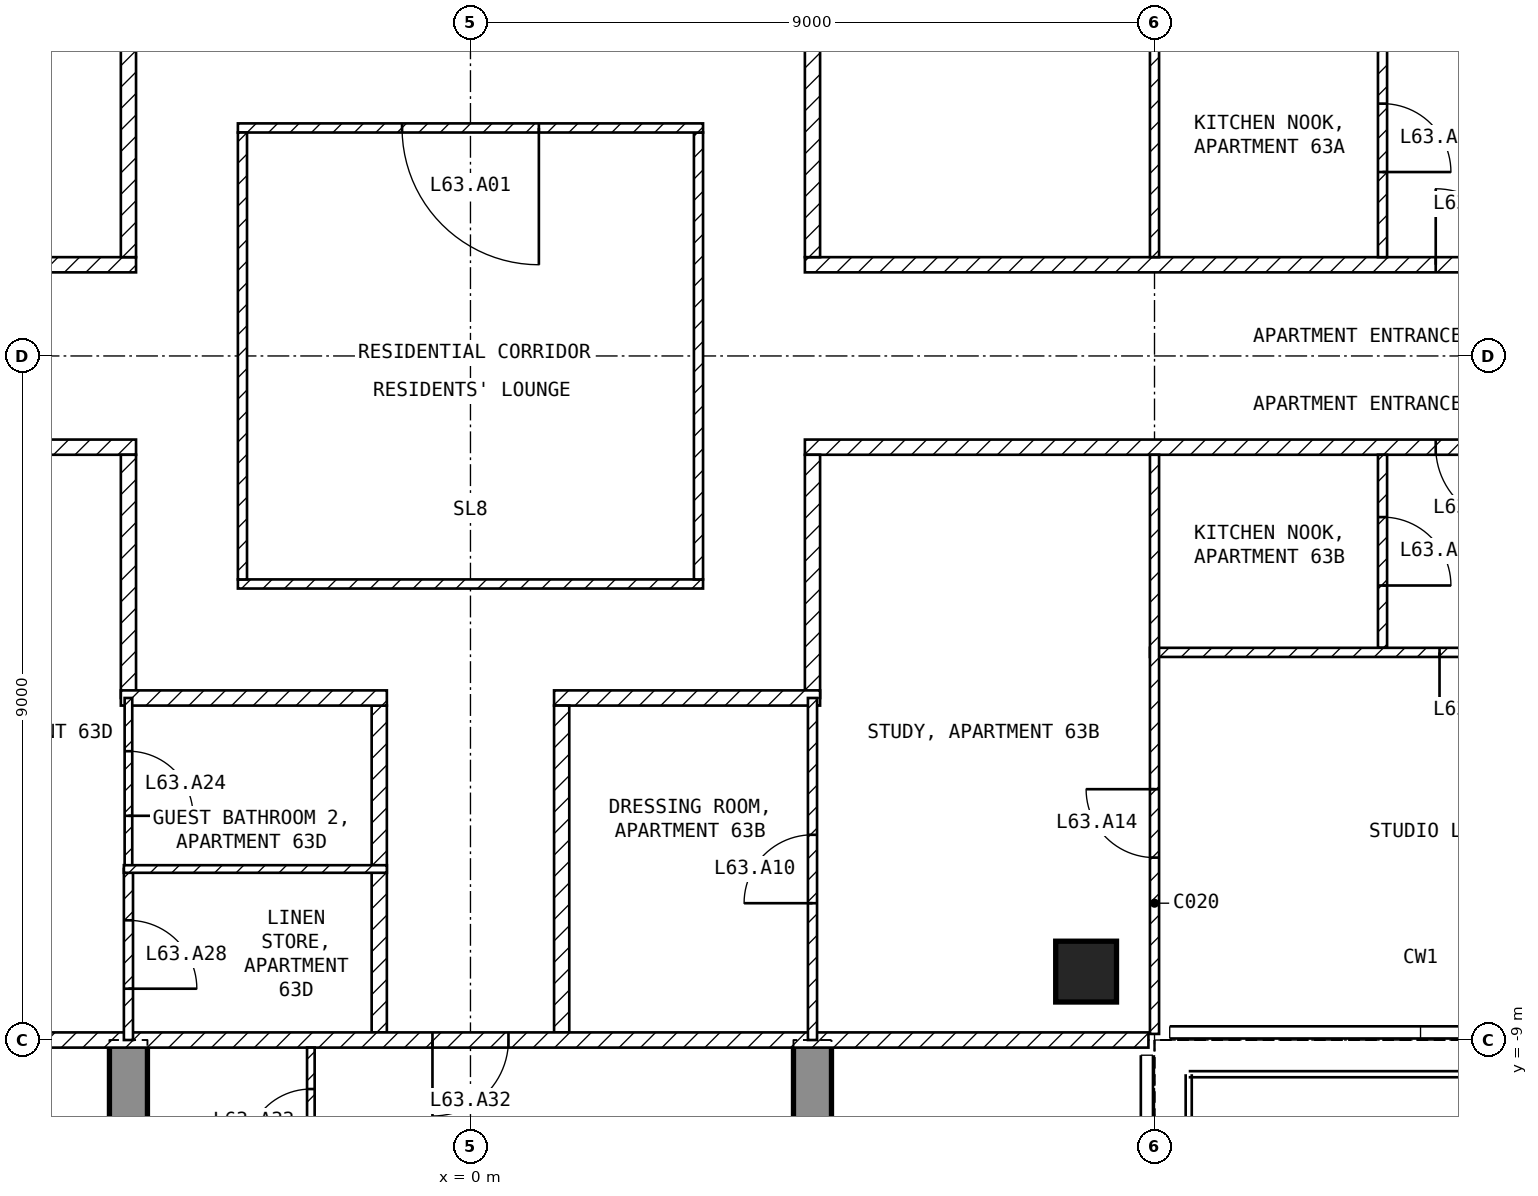
"""IFC4 building model, lengths in metres.
Left out: names, types, materials, properties, quantities, classifications, styles, units other than length and angle.
Written with IfcOpenShell. Run it as: python <this file> out.ifc"""

import sys

from ifc_helpers import new_model, si_unit, direction, frame, frame_2d, origin, origin_2d, place, context, subcontext, project, spatial, polyline, rectangle, outline, extrude, element, fill, save


model = new_model("IFC4")
c1 = context("Model", 3, precision=1e-05, world=origin(), true_north=direction((0.0, 1.0)))
c2 = subcontext(c1, "Body", "Model", "MODEL_VIEW")
j1 = project(units=[si_unit("LENGTHUNIT", "METRE"), si_unit("PLANEANGLEUNIT", "RADIAN")], contexts=[c1])
p1 = place(None, origin())
s1 = spatial("IfcSite", under=j1, at=p1, CompositionType="ELEMENT")
p2 = place(p1, origin())
s2 = spatial("IfcBuilding", under=s1, at=p2, CompositionType="ELEMENT")
p3 = place(p2, frame((0.0, 0.0, 250.0)))
s3 = spatial("IfcBuildingStorey", under=s2, at=p3, CompositionType="ELEMENT", Elevation=250.0)
p4 = place(p3, frame((8.1, -8.1, -0.25), z_axis=(0.0, 0.0, 1.0), x_axis=(1.0, 0.0, 0.0)))
e1 = element("IfcColumn", 1, at=p4, inside=s3, PredefinedType="COLUMN", context=c2, shape_type="SweptSolid", body=[
    extrude(rectangle(XDim=0.8, YDim=0.8, at=origin_2d()), origin(), (0.0, 0.0, 1.0), 3.5),
])
for number, where, z_axis, x_axis in (
    (2, (-4.75, -16.7, -0.25), (1.0, 0.0, 0.0), (0.0, 1.0, 0.0)),
    (3, (4.25, -16.7, -0.25), (1.0, 0.0, 0.0), (0.0, 1.0, 0.0)),
):
    element("IfcWall", number, at=place(p3, frame(where, z_axis=z_axis, x_axis=x_axis)), inside=s3, PredefinedType="SHEAR", context=c2, shape_type="SweptSolid", body=[
        extrude(outline(polyline([(0.0, 0.0), (3.2, 0.0), (3.2, 2.65), (5.6, 2.65), (5.6, 0.0), (7.7, 0.0), (7.7, 3.5), (0.0, 3.5), (0.0, 0.0)])), origin(), (0.0, 0.0, 1.0), 0.5),
    ])
p5 = place(p3, frame((-3.06, -3.0, 0.0), z_axis=(0.0, 0.0, 1.0), x_axis=(1.0, 0.0, 0.0)))
e4 = element("IfcWall", 4, at=p5, inside=s3, PredefinedType="PARTITIONING", context=c2, shape_type="SweptSolid", body=[
    extrude(rectangle(XDim=6.12, YDim=0.12, at=frame_2d((3.06, 0.0))), origin(), (0.0, 0.0, 1.0), 3.25),
])
p6 = place(p3, frame((3.0, -2.94, 0.0), z_axis=(0.0, 0.0, 1.0), x_axis=(0.0, 1.0, 0.0)))
e5 = element("IfcWall", 5, at=p6, inside=s3, PredefinedType="PARTITIONING", context=c2, shape_type="SweptSolid", body=[
    extrude(rectangle(XDim=5.88, YDim=0.12, at=frame_2d((2.94, 0.0))), origin(), (0.0, 0.0, 1.0), 3.25),
])
p7 = place(p3, frame((3.06, 3.0, 0.0), z_axis=(0.0, 0.0, 1.0), x_axis=(-1.0, 0.0, 0.0)))
e6 = element("IfcWall", 6, at=p7, inside=s3, PredefinedType="PARTITIONING", context=c2, shape_type="SweptSolid", body=[
    extrude(rectangle(XDim=6.12, YDim=0.12, at=frame_2d((3.06, 0.0))), origin(), (0.0, 0.0, 1.0), 3.25),
])
p8 = place(p7, frame((2.16, 0.0, 0.0)))
e7 = element("IfcOpeningElement", 7, at=p8, cuts=e6, PredefinedType="OPENING", context=c2, shape_type="SweptSolid", body=[
    extrude(rectangle(XDim=1.8, YDim=2.1, at=frame_2d((0.9, 1.05))), frame((0.0, 0.07, 0.0), z_axis=(0.0, -1.0, 0.0), x_axis=(1.0, 0.0, 0.0)), (0.0, 0.0, 1.0), 0.14),
])
p9 = place(p3, frame((-3.0, 2.94, 0.0), z_axis=(0.0, 0.0, 1.0), x_axis=(0.0, -1.0, 0.0)))
e8 = element("IfcWall", 8, at=p9, inside=s3, PredefinedType="PARTITIONING", context=c2, shape_type="SweptSolid", body=[
    extrude(rectangle(XDim=5.88, YDim=0.12, at=frame_2d((2.94, 0.0))), origin(), (0.0, 0.0, 1.0), 3.25),
])
p10 = place(p3, frame((4.4, 1.2, 0.0), z_axis=(0.0, 0.0, 1.0), x_axis=(1.0, 0.0, 0.0)))
e9 = element("IfcWall", 9, at=p10, inside=s3, PredefinedType="PARTITIONING", context=c2, shape_type="SweptSolid", body=[
    extrude(rectangle(XDim=17.2, YDim=0.2, at=frame_2d((8.6, 0.0))), origin(), (0.0, 0.0, 1.0), 3.25),
])
p11 = place(p10, frame((8.3, 0.0, 0.0)))
e10 = element("IfcOpeningElement", 10, at=p11, cuts=e9, PredefinedType="OPENING", context=c2, shape_type="SweptSolid", body=[
    extrude(rectangle(XDim=1.0, YDim=2.1, at=frame_2d((0.5, 1.05))), frame((0.0, 0.11, 0.0), z_axis=(0.0, -1.0, 0.0), x_axis=(1.0, 0.0, 0.0)), (0.0, 0.0, 1.0), 0.22),
])
p12 = place(p3, frame((4.5, 4.5, 0.0), z_axis=(0.0, 0.0, 1.0), x_axis=(0.0, -1.0, 0.0)))
e11 = element("IfcWall", 11, at=p12, inside=s3, PredefinedType="PARTITIONING", context=c2, shape_type="SweptSolid", body=[
    extrude(rectangle(XDim=3.2, YDim=0.2, at=frame_2d((1.6, 0.0))), origin(), (0.0, 0.0, 1.0), 3.25),
])
p13 = place(p3, frame((21.6, -1.2, 0.0), z_axis=(0.0, 0.0, 1.0), x_axis=(-1.0, 0.0, 0.0)))
e12 = element("IfcWall", 12, at=p13, inside=s3, PredefinedType="PARTITIONING", context=c2, shape_type="SweptSolid", body=[
    extrude(rectangle(XDim=17.2, YDim=0.2, at=frame_2d((8.6, 0.0))), origin(), (0.0, 0.0, 1.0), 3.25),
])
p14 = place(p13, frame((7.9, 0.0, 0.0)))
e13 = element("IfcOpeningElement", 13, at=p14, cuts=e12, PredefinedType="OPENING", context=c2, shape_type="SweptSolid", body=[
    extrude(rectangle(XDim=1.0, YDim=2.1, at=frame_2d((0.5, 1.05))), frame((0.0, 0.11, 0.0), z_axis=(0.0, -1.0, 0.0), x_axis=(1.0, 0.0, 0.0)), (0.0, 0.0, 1.0), 0.22),
])
p15 = place(p3, frame((4.5, -1.3, 0.0), z_axis=(0.0, 0.0, 1.0), x_axis=(0.0, -1.0, 0.0)))
e14 = element("IfcWall", 14, at=p15, inside=s3, PredefinedType="PARTITIONING", context=c2, shape_type="SweptSolid", body=[
    extrude(rectangle(XDim=3.2, YDim=0.2, at=frame_2d((1.6, 0.0))), origin(), (0.0, 0.0, 1.0), 3.25),
])
p16 = place(p3, frame((4.6, -4.5, 0.0), z_axis=(0.0, 0.0, 1.0), x_axis=(-1.0, 0.0, 0.0)))
e15 = element("IfcWall", 15, at=p16, inside=s3, PredefinedType="PARTITIONING", context=c2, shape_type="SweptSolid", body=[
    extrude(rectangle(XDim=3.5, YDim=0.2, at=frame_2d((1.75, 0.0))), origin(), (0.0, 0.0, 1.0), 3.25),
])
p17 = place(p3, frame((1.2, -4.6, 0.0), z_axis=(0.0, 0.0, 1.0), x_axis=(0.0, -1.0, 0.0)))
e16 = element("IfcWall", 16, at=p17, inside=s3, PredefinedType="PARTITIONING", context=c2, shape_type="SweptSolid", body=[
    extrude(rectangle(XDim=4.3, YDim=0.2, at=frame_2d((2.15, 0.0))), origin(), (0.0, 0.0, 1.0), 3.25),
])
p18 = place(p3, frame((-21.6, 1.2, 0.0), z_axis=(0.0, 0.0, 1.0), x_axis=(1.0, 0.0, 0.0)))
e17 = element("IfcWall", 17, at=p18, inside=s3, PredefinedType="PARTITIONING", context=c2, shape_type="SweptSolid", body=[
    extrude(rectangle(XDim=17.2, YDim=0.2, at=frame_2d((8.6, 0.0))), origin(), (0.0, 0.0, 1.0), 3.25),
])
p19 = place(p18, frame((10.3, 0.0, 0.0)))
e18 = element("IfcOpeningElement", 18, at=p19, cuts=e17, PredefinedType="OPENING", context=c2, shape_type="SweptSolid", body=[
    extrude(rectangle(XDim=1.0, YDim=2.1, at=frame_2d((0.5, 1.05))), frame((0.0, 0.11, 0.0), z_axis=(0.0, -1.0, 0.0), x_axis=(1.0, 0.0, 0.0)), (0.0, 0.0, 1.0), 0.22),
])
p20 = place(p3, frame((-4.5, 1.3, 0.0), z_axis=(0.0, 0.0, 1.0), x_axis=(0.0, 1.0, 0.0)))
e19 = element("IfcWall", 19, at=p20, inside=s3, PredefinedType="PARTITIONING", context=c2, shape_type="SweptSolid", body=[
    extrude(rectangle(XDim=3.2, YDim=0.2, at=frame_2d((1.6, 0.0))), origin(), (0.0, 0.0, 1.0), 3.25),
])
p21 = place(p3, frame((-4.4, -1.2, 0.0), z_axis=(0.0, 0.0, 1.0), x_axis=(-1.0, 0.0, 0.0)))
e20 = element("IfcWall", 20, at=p21, inside=s3, PredefinedType="PARTITIONING", context=c2, shape_type="SweptSolid", body=[
    extrude(rectangle(XDim=17.2, YDim=0.2, at=frame_2d((8.6, 0.0))), origin(), (0.0, 0.0, 1.0), 3.25),
])
p22 = place(p21, frame((5.375, 0.0, 0.0)))
e21 = element("IfcOpeningElement", 21, at=p22, cuts=e20, PredefinedType="OPENING", context=c2, shape_type="SweptSolid", body=[
    extrude(rectangle(XDim=1.0, YDim=2.1, at=frame_2d((0.5, 1.05))), frame((0.0, 0.11, 0.0), z_axis=(0.0, -1.0, 0.0), x_axis=(1.0, 0.0, 0.0)), (0.0, 0.0, 1.0), 0.22),
])
p23 = place(p3, frame((-4.5, -4.5, 0.0), z_axis=(0.0, 0.0, 1.0), x_axis=(0.0, 1.0, 0.0)))
e22 = element("IfcWall", 22, at=p23, inside=s3, PredefinedType="PARTITIONING", context=c2, shape_type="SweptSolid", body=[
    extrude(rectangle(XDim=3.2, YDim=0.2, at=frame_2d((1.6, 0.0))), origin(), (0.0, 0.0, 1.0), 3.25),
])
p24 = place(p3, frame((-1.2, -8.9, 0.0), z_axis=(0.0, 0.0, 1.0), x_axis=(0.0, 1.0, 0.0)))
e23 = element("IfcWall", 23, at=p24, inside=s3, PredefinedType="PARTITIONING", context=c2, shape_type="SweptSolid", body=[
    extrude(rectangle(XDim=4.3, YDim=0.2, at=frame_2d((2.15, 0.0))), origin(), (0.0, 0.0, 1.0), 3.25),
])
p25 = place(p3, frame((-1.1, -4.5, 0.0), z_axis=(0.0, 0.0, 1.0), x_axis=(-1.0, 0.0, 0.0)))
e24 = element("IfcWall", 24, at=p25, inside=s3, PredefinedType="PARTITIONING", context=c2, shape_type="SweptSolid", body=[
    extrude(rectangle(XDim=3.5, YDim=0.2, at=frame_2d((1.75, 0.0))), origin(), (0.0, 0.0, 1.0), 3.25),
])
p26 = place(p3, frame((8.92, -9.0, 0.0), z_axis=(0.0, 0.0, 1.0), x_axis=(-1.0, 0.0, 0.0)))
e25 = element("IfcWall", 25, at=p26, inside=s3, PredefinedType="PARTITIONING", context=c2, shape_type="SweptSolid", body=[
    extrude(rectangle(XDim=17.84, YDim=0.2, at=frame_2d((8.92, 0.0))), origin(), (0.0, 0.0, 1.0), 3.25),
])
p27 = place(p26, frame((8.42, 0.0, 0.0)))
e26 = element("IfcOpeningElement", 26, at=p27, cuts=e25, PredefinedType="OPENING", context=c2, shape_type="SweptSolid", body=[
    extrude(rectangle(XDim=1.0, YDim=2.1, at=frame_2d((0.5, 1.05))), frame((0.0, 0.11, 0.0), z_axis=(0.0, -1.0, 0.0), x_axis=(1.0, 0.0, 0.0)), (0.0, 0.0, 1.0), 0.22),
])
p28 = place(p3, frame((12.0, 4.44, 0.0), z_axis=(0.0, 0.0, 1.0), x_axis=(0.0, -1.0, 0.0)))
e27 = element("IfcWall", 27, at=p28, inside=s3, PredefinedType="PARTITIONING", context=c2, shape_type="SweptSolid", body=[
    extrude(rectangle(XDim=3.14, YDim=0.12, at=frame_2d((1.57, 0.0))), origin(), (0.0, 0.0, 1.0), 3.25),
])
p29 = place(p28, frame((1.12, 0.0, 0.0)))
e28 = element("IfcOpeningElement", 28, at=p29, cuts=e27, PredefinedType="OPENING", context=c2, shape_type="SweptSolid", body=[
    extrude(rectangle(XDim=0.9, YDim=2.1, at=frame_2d((0.45, 1.05))), frame((0.0, 0.07, 0.0), z_axis=(0.0, -1.0, 0.0), x_axis=(1.0, 0.0, 0.0)), (0.0, 0.0, 1.0), 0.14),
])
p30 = place(p3, frame((9.0, 1.3, 0.0), z_axis=(0.0, 0.0, 1.0), x_axis=(0.0, 1.0, 0.0)))
e29 = element("IfcWall", 29, at=p30, inside=s3, PredefinedType="PARTITIONING", context=c2, shape_type="SweptSolid", body=[
    extrude(rectangle(XDim=7.62, YDim=0.12, at=frame_2d((3.81, 0.0))), origin(), (0.0, 0.0, 1.0), 3.25),
])
p31 = place(p30, frame((4.25, 0.0, 0.0)))
e30 = element("IfcOpeningElement", 30, at=p31, cuts=e29, PredefinedType="OPENING", context=c2, shape_type="SweptSolid", body=[
    extrude(rectangle(XDim=0.9, YDim=2.1, at=frame_2d((0.45, 1.05))), frame((0.0, 0.07, 0.0), z_axis=(0.0, -1.0, 0.0), x_axis=(1.0, 0.0, 0.0)), (0.0, 0.0, 1.0), 0.14),
])
p32 = place(p3, frame((12.0, -1.3, 0.0), z_axis=(0.0, 0.0, 1.0), x_axis=(0.0, -1.0, 0.0)))
e31 = element("IfcWall", 31, at=p32, inside=s3, PredefinedType="PARTITIONING", context=c2, shape_type="SweptSolid", body=[
    extrude(rectangle(XDim=2.54, YDim=0.12, at=frame_2d((1.27, 0.0))), origin(), (0.0, 0.0, 1.0), 3.25),
])
p33 = place(p32, frame((0.82, 0.0, 0.0)))
e32 = element("IfcOpeningElement", 32, at=p33, cuts=e31, PredefinedType="OPENING", context=c2, shape_type="SweptSolid", body=[
    extrude(rectangle(XDim=0.9, YDim=2.1, at=frame_2d((0.45, 1.05))), frame((0.0, 0.07, 0.0), z_axis=(0.0, -1.0, 0.0), x_axis=(1.0, 0.0, 0.0)), (0.0, 0.0, 1.0), 0.14),
])
p34 = place(p3, frame((16.8, -3.9, 0.0), z_axis=(0.0, 0.0, 1.0), x_axis=(-1.0, 0.0, 0.0)))
e33 = element("IfcWall", 33, at=p34, inside=s3, PredefinedType="PARTITIONING", context=c2, shape_type="SweptSolid", body=[
    extrude(rectangle(XDim=7.86, YDim=0.12, at=frame_2d((3.93, 0.0))), origin(), (0.0, 0.0, 1.0), 3.25),
])
p35 = place(p34, frame((3.15, 0.0, 0.0)))
e34 = element("IfcOpeningElement", 34, at=p35, cuts=e33, PredefinedType="OPENING", context=c2, shape_type="SweptSolid", body=[
    extrude(rectangle(XDim=0.9, YDim=2.1, at=frame_2d((0.45, 1.05))), frame((0.0, 0.07, 0.0), z_axis=(0.0, -1.0, 0.0), x_axis=(1.0, 0.0, 0.0)), (0.0, 0.0, 1.0), 0.14),
])
p36 = place(p3, frame((9.0, -8.92, 0.0), z_axis=(0.0, 0.0, 1.0), x_axis=(0.0, 1.0, 0.0)))
e35 = element("IfcWall", 35, at=p36, inside=s3, PredefinedType="PARTITIONING", context=c2, shape_type="SweptSolid", body=[
    extrude(rectangle(XDim=7.62, YDim=0.12, at=frame_2d((3.81, 0.0))), origin(), (0.0, 0.0, 1.0), 3.25),
])
p37 = place(p36, frame((2.32, 0.0, 0.0)))
e36 = element("IfcOpeningElement", 36, at=p37, cuts=e35, PredefinedType="OPENING", context=c2, shape_type="SweptSolid", body=[
    extrude(rectangle(XDim=0.9, YDim=2.1, at=frame_2d((0.45, 1.05))), frame((0.0, 0.07, 0.0), z_axis=(0.0, -1.0, 0.0), x_axis=(1.0, 0.0, 0.0)), (0.0, 0.0, 1.0), 0.14),
])
p38 = place(p3, frame((4.5, -9.0, 0.0), z_axis=(0.0, 0.0, 1.0), x_axis=(0.0, 1.0, 0.0)))
e37 = element("IfcWall", 37, at=p38, inside=s3, PredefinedType="PARTITIONING", context=c2, shape_type="SweptSolid", body=[
    extrude(rectangle(XDim=4.5, YDim=0.12, at=frame_2d((2.25, 0.0))), origin(), (0.0, 0.0, 1.0), 3.25),
])
p39 = place(p38, frame((1.8, 0.0, 0.0)))
e38 = element("IfcOpeningElement", 38, at=p39, cuts=e37, PredefinedType="OPENING", context=c2, shape_type="SweptSolid", body=[
    extrude(rectangle(XDim=0.9, YDim=2.1, at=frame_2d((0.45, 1.05))), frame((0.0, 0.07, 0.0), z_axis=(0.0, -1.0, 0.0), x_axis=(1.0, 0.0, 0.0)), (0.0, 0.0, 1.0), 0.14),
])
p40 = place(p3, frame((-4.5, -4.5, 0.0), z_axis=(0.0, 0.0, 1.0), x_axis=(0.0, -1.0, 0.0)))
e39 = element("IfcWall", 39, at=p40, inside=s3, PredefinedType="PARTITIONING", context=c2, shape_type="SweptSolid", body=[
    extrude(rectangle(XDim=2.25, YDim=0.1, at=frame_2d((1.125, 0.0))), origin(), (0.0, 0.0, 1.0), 3.25),
])
p41 = place(p40, frame((0.7, 0.0, 0.0)))
e40 = element("IfcOpeningElement", 40, at=p41, cuts=e39, PredefinedType="OPENING", context=c2, shape_type="SweptSolid", body=[
    extrude(rectangle(XDim=0.85, YDim=2.1, at=frame_2d((0.425, 1.05))), frame((0.0, 0.06, 0.0), z_axis=(0.0, -1.0, 0.0), x_axis=(1.0, 0.0, 0.0)), (0.0, 0.0, 1.0), 0.12),
])
p42 = place(p3, frame((-4.5, -6.75, 0.0), z_axis=(0.0, 0.0, 1.0), x_axis=(0.0, -1.0, 0.0)))
e41 = element("IfcWall", 41, at=p42, inside=s3, PredefinedType="PARTITIONING", context=c2, shape_type="SweptSolid", body=[
    extrude(rectangle(XDim=2.25, YDim=0.12, at=frame_2d((1.125, 0.0))), origin(), (0.0, 0.0, 1.0), 3.25),
])
p43 = place(p42, frame((0.675, 0.0, 0.0)))
e42 = element("IfcOpeningElement", 42, at=p43, cuts=e41, PredefinedType="OPENING", context=c2, shape_type="SweptSolid", body=[
    extrude(rectangle(XDim=0.9, YDim=2.1, at=frame_2d((0.45, 1.05))), frame((0.0, 0.07, 0.0), z_axis=(0.0, -1.0, 0.0), x_axis=(1.0, 0.0, 0.0)), (0.0, 0.0, 1.0), 0.14),
])
p44 = place(p3, frame((-1.1, -6.75, 0.0), z_axis=(0.0, 0.0, 1.0), x_axis=(-1.0, 0.0, 0.0)))
e43 = element("IfcWall", 43, at=p44, inside=s3, PredefinedType="PARTITIONING", context=c2, shape_type="SweptSolid", body=[
    extrude(rectangle(XDim=3.46, YDim=0.1, at=frame_2d((1.73, 0.0))), origin(), (0.0, 0.0, 1.0), 3.25),
])
p45 = place(p3, frame((-2.1, -11.04, 0.0), z_axis=(0.0, 0.0, 1.0), x_axis=(0.0, 1.0, 0.0)))
e44 = element("IfcWall", 44, at=p45, inside=s3, PredefinedType="PARTITIONING", context=c2, shape_type="SweptSolid", body=[
    extrude(rectangle(XDim=1.94, YDim=0.1, at=frame_2d((0.97, 0.0))), origin(), (0.0, 0.0, 1.0), 3.25),
])
p46 = place(p45, frame((0.545, 0.0, 0.0)))
e45 = element("IfcOpeningElement", 45, at=p46, cuts=e44, PredefinedType="OPENING", context=c2, shape_type="SweptSolid", body=[
    extrude(rectangle(XDim=0.85, YDim=2.1, at=frame_2d((0.425, 1.05))), frame((0.0, 0.06, 0.0), z_axis=(0.0, -1.0, 0.0), x_axis=(1.0, 0.0, 0.0)), (0.0, 0.0, 1.0), 0.12),
])
p47 = place(p8, origin())
e46 = element("IfcDoor", 46, at=p47, inside=s3, OperationType="SINGLE_SWING_LEFT", PredefinedType="DOOR", context=c2, shape_type="SweptSolid", body=[
    extrude(rectangle(XDim=1.8, YDim=2.1, at=frame_2d((0.9, 1.05))), frame((0.0, 0.025, 0.0), z_axis=(0.0, -1.0, 0.0), x_axis=(1.0, 0.0, 0.0)), (0.0, 0.0, 1.0), 0.05),
])
fill(e7, e46)
p48 = place(p29, origin())
e47 = element("IfcDoor", 47, at=p48, inside=s3, OperationType="SINGLE_SWING_RIGHT", PredefinedType="DOOR", context=c2, shape_type="SweptSolid", body=[
    extrude(rectangle(XDim=0.9, YDim=2.1, at=frame_2d((0.45, 1.05))), frame((0.0, 0.025, 0.0), z_axis=(0.0, -1.0, 0.0), x_axis=(1.0, 0.0, 0.0)), (0.0, 0.0, 1.0), 0.05),
])
fill(e28, e47)
p49 = place(p39, origin())
e48 = element("IfcDoor", 48, at=p49, inside=s3, OperationType="SINGLE_SWING_LEFT", PredefinedType="DOOR", context=c2, shape_type="SweptSolid", body=[
    extrude(rectangle(XDim=0.9, YDim=2.1, at=frame_2d((0.45, 1.05))), frame((0.0, 0.025, 0.0), z_axis=(0.0, -1.0, 0.0), x_axis=(1.0, 0.0, 0.0)), (0.0, 0.0, 1.0), 0.05),
])
fill(e38, e48)
p50 = place(p33, origin())
e49 = element("IfcDoor", 49, at=p50, inside=s3, OperationType="SINGLE_SWING_RIGHT", PredefinedType="DOOR", context=c2, shape_type="SweptSolid", body=[
    extrude(rectangle(XDim=0.9, YDim=2.1, at=frame_2d((0.45, 1.05))), frame((0.0, 0.025, 0.0), z_axis=(0.0, -1.0, 0.0), x_axis=(1.0, 0.0, 0.0)), (0.0, 0.0, 1.0), 0.05),
])
fill(e32, e49)
p51 = place(p35, origin())
e50 = element("IfcDoor", 50, at=p51, inside=s3, OperationType="SINGLE_SWING_RIGHT", PredefinedType="DOOR", context=c2, shape_type="SweptSolid", body=[
    extrude(rectangle(XDim=0.9, YDim=2.1, at=frame_2d((0.45, 1.05))), frame((0.0, 0.025, 0.0), z_axis=(0.0, -1.0, 0.0), x_axis=(1.0, 0.0, 0.0)), (0.0, 0.0, 1.0), 0.05),
])
fill(e34, e50)
p52 = place(p37, origin())
e51 = element("IfcDoor", 51, at=p52, inside=s3, OperationType="SINGLE_SWING_RIGHT", PredefinedType="DOOR", context=c2, shape_type="SweptSolid", body=[
    extrude(rectangle(XDim=0.9, YDim=2.1, at=frame_2d((0.45, 1.05))), frame((0.0, 0.025, 0.0), z_axis=(0.0, -1.0, 0.0), x_axis=(1.0, 0.0, 0.0)), (0.0, 0.0, 1.0), 0.05),
])
fill(e36, e51)
p53 = place(p41, origin())
e52 = element("IfcDoor", 52, at=p53, inside=s3, OperationType="SINGLE_SWING_RIGHT", PredefinedType="DOOR", context=c2, shape_type="SweptSolid", body=[
    extrude(rectangle(XDim=0.85, YDim=2.1, at=frame_2d((0.425, 1.05))), frame((0.0, 0.025, 0.0), z_axis=(0.0, -1.0, 0.0), x_axis=(1.0, 0.0, 0.0)), (0.0, 0.0, 1.0), 0.05),
])
fill(e40, e52)
p54 = place(p43, origin())
e53 = element("IfcDoor", 53, at=p54, inside=s3, OperationType="SINGLE_SWING_RIGHT", PredefinedType="DOOR", context=c2, shape_type="SweptSolid", body=[
    extrude(rectangle(XDim=0.9, YDim=2.1, at=frame_2d((0.45, 1.05))), frame((0.0, 0.025, 0.0), z_axis=(0.0, -1.0, 0.0), x_axis=(1.0, 0.0, 0.0)), (0.0, 0.0, 1.0), 0.05),
])
fill(e42, e53)
p55 = place(p27, origin())
e54 = element("IfcDoor", 54, at=p55, inside=s3, OperationType="SINGLE_SWING_RIGHT", PredefinedType="DOOR", context=c2, shape_type="SweptSolid", body=[
    extrude(rectangle(XDim=1.0, YDim=2.1, at=frame_2d((0.5, 1.05))), frame((0.0, 0.025, 0.0), z_axis=(0.0, -1.0, 0.0), x_axis=(1.0, 0.0, 0.0)), (0.0, 0.0, 1.0), 0.05),
])
fill(e26, e54)
p56 = place(p46, origin())
e55 = element("IfcDoor", 55, at=p56, inside=s3, OperationType="SINGLE_SWING_LEFT", PredefinedType="DOOR", context=c2, shape_type="SweptSolid", body=[
    extrude(rectangle(XDim=0.85, YDim=2.1, at=frame_2d((0.425, 1.05))), frame((0.0, 0.025, 0.0), z_axis=(0.0, -1.0, 0.0), x_axis=(1.0, 0.0, 0.0)), (0.0, 0.0, 1.0), 0.05),
])
fill(e45, e55)
p57 = place(p11, origin())
e56 = element("IfcDoor", 56, at=p57, inside=s3, OperationType="SINGLE_SWING_LEFT", PredefinedType="DOOR", context=c2, shape_type="SweptSolid", body=[
    extrude(rectangle(XDim=1.0, YDim=2.1, at=frame_2d((0.5, 1.05))), frame((0.0, 0.025, 0.0), z_axis=(0.0, -1.0, 0.0), x_axis=(1.0, 0.0, 0.0)), (0.0, 0.0, 1.0), 0.05),
])
fill(e10, e56)
p58 = place(p14, origin())
e57 = element("IfcDoor", 57, at=p58, inside=s3, OperationType="SINGLE_SWING_LEFT", PredefinedType="DOOR", context=c2, shape_type="SweptSolid", body=[
    extrude(rectangle(XDim=1.0, YDim=2.1, at=frame_2d((0.5, 1.05))), frame((0.0, 0.025, 0.0), z_axis=(0.0, -1.0, 0.0), x_axis=(1.0, 0.0, 0.0)), (0.0, 0.0, 1.0), 0.05),
])
fill(e13, e57)
save(model, sys.argv[1])
